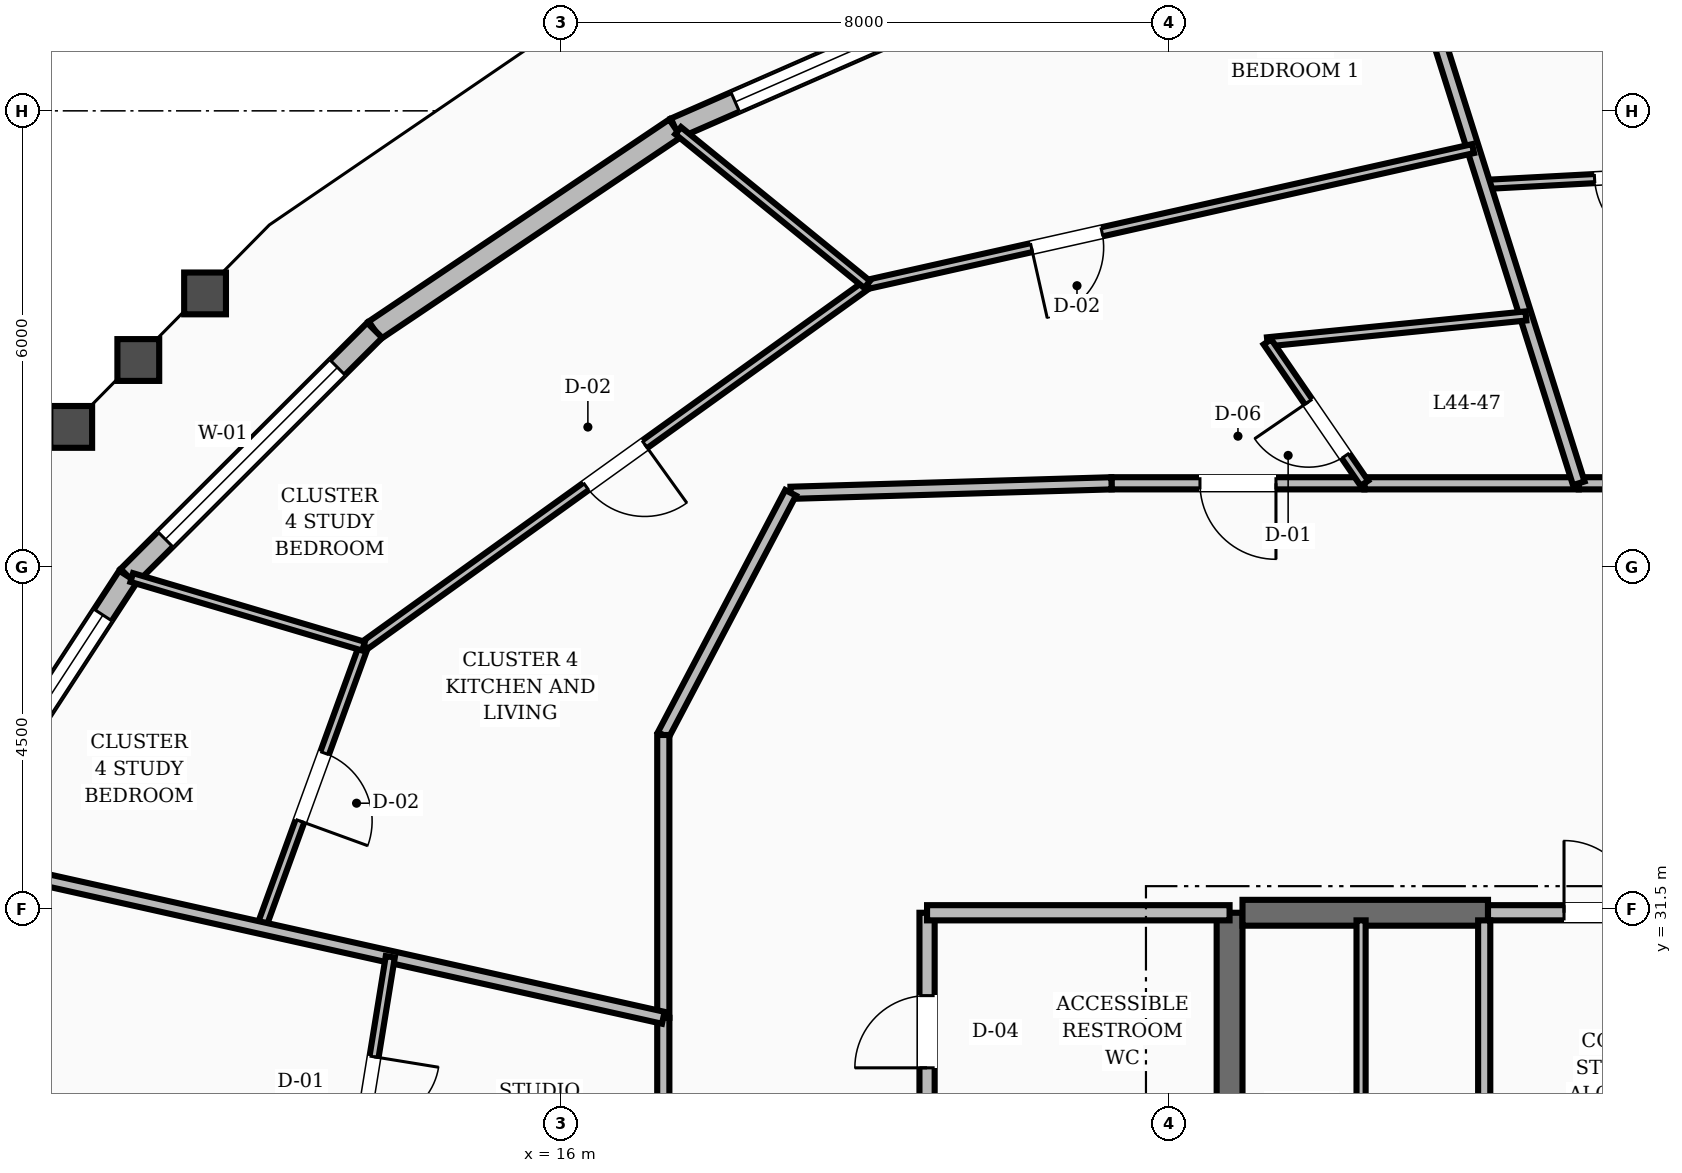
"""IFC4 building model, lengths in metres.
Left out: names, types, materials, properties, quantities, classifications, styles, units other than length and angle.
Written with IfcOpenShell. Run it as: python <this file> out.ifc"""

import sys

from ifc_helpers import new_model, si_unit, direction, frame, frame_2d, origin, place, context, subcontext, project, spatial, rectangle, extrude, element, fill, save


model = new_model("IFC4")
c1 = context("Model", 3, precision=1e-05, world=origin(), true_north=direction((0.0, 1.0)))
c2 = subcontext(c1, "Body", "Model", "MODEL_VIEW")
j1 = project(units=[si_unit("LENGTHUNIT", "METRE"), si_unit("PLANEANGLEUNIT", "RADIAN")], contexts=[c1])
p1 = place(None, origin())
s1 = spatial("IfcSite", under=j1, at=p1, CompositionType="ELEMENT")
p2 = place(p1, origin())
s2 = spatial("IfcBuilding", under=s1, at=p2, CompositionType="ELEMENT")
p3 = place(p2, frame((0.0, 0.0, 171.2)))
s3 = spatial("IfcBuildingStorey", under=s2, at=p3, CompositionType="ELEMENT", Elevation=171.2)
p4 = place(p3, frame((24.8, 25.15, 0.0), z_axis=(0.0, 0.0, 1.0), x_axis=(0.0, 1.0, 0.0)))
e1 = element("IfcWall", 1, at=p4, inside=s3, PredefinedType="SHEAR", context=c2, shape_type="SweptSolid", body=[
    extrude(rectangle(XDim=6.3, YDim=0.34, at=frame_2d((3.15, 0.0))), origin(), (0.0, 0.0, 1.0), 3.6),
])
p5 = place(p3, frame((24.97, 31.45, 0.0), z_axis=(0.0, 0.0, 1.0), x_axis=(1.0, 0.0, 0.0)))
e2 = element("IfcWall", 2, at=p5, inside=s3, PredefinedType="SHEAR", context=c2, shape_type="SweptSolid", body=[
    extrude(rectangle(XDim=3.23, YDim=0.34, at=frame_2d((1.615, 0.0))), origin(), (0.0, 0.0, 1.0), 3.6),
])
p6 = place(p3, frame((22.017, 43.747, 0.0), z_axis=(0.0, 0.0, 1.0), x_axis=(-0.916018444192, -0.401136148832, 0.0)))
e3 = element("IfcWall", 3, at=p6, inside=s3, PredefinedType="STANDARD", context=c2, shape_type="SweptSolid", body=[
    extrude(rectangle(XDim=4.924, YDim=0.28, at=frame_2d((2.462, 0.0))), origin(), (0.0, 0.0, 1.0), 2.82),
])
p7 = place(p6, frame((0.862, 0.0, 0.8)))
e4 = element("IfcOpeningElement", 4, at=p7, cuts=e3, PredefinedType="OPENING", context=c2, shape_type="SweptSolid", body=[
    extrude(rectangle(XDim=3.2, YDim=1.65, at=frame_2d((1.6, 0.825))), frame((0.0, 0.15, 0.0), z_axis=(0.0, -1.0, 0.0), x_axis=(1.0, 0.0, 0.0)), (0.0, 0.0, 1.0), 0.3),
])
p8 = place(p3, frame((17.506, 41.771, 0.0), z_axis=(0.0, 0.0, 1.0), x_axis=(-0.82985197946, -0.557983594909, 0.0)))
e5 = element("IfcWall", 5, at=p8, inside=s3, PredefinedType="STANDARD", context=c2, shape_type="SweptSolid", body=[
    extrude(rectangle(XDim=4.764, YDim=0.28, at=frame_2d((2.382, 0.0))), origin(), (0.0, 0.0, 1.0), 2.82),
])
p9 = place(p3, frame((13.553, 39.113, 0.0), z_axis=(0.0, 0.0, 1.0), x_axis=(-0.707692376563, -0.706520700443, 0.0)))
e6 = element("IfcWall", 6, at=p9, inside=s3, PredefinedType="STANDARD", context=c2, shape_type="SweptSolid", body=[
    extrude(rectangle(XDim=4.584, YDim=0.28, at=frame_2d((2.292, 0.0))), origin(), (0.0, 0.0, 1.0), 2.82),
])
p10 = place(p9, frame((0.692, 0.0, 0.8)))
e7 = element("IfcOpeningElement", 7, at=p10, cuts=e6, PredefinedType="OPENING", context=c2, shape_type="SweptSolid", body=[
    extrude(rectangle(XDim=3.2, YDim=1.65, at=frame_2d((1.6, 0.825))), frame((0.0, 0.15, 0.0), z_axis=(0.0, -1.0, 0.0), x_axis=(1.0, 0.0, 0.0)), (0.0, 0.0, 1.0), 0.3),
])
p11 = place(p3, frame((10.309, 35.875, 0.0), z_axis=(0.0, 0.0, 1.0), x_axis=(-0.546411241489, -0.837517017841, 0.0)))
e8 = element("IfcWall", 8, at=p11, inside=s3, PredefinedType="STANDARD", context=c2, shape_type="SweptSolid", body=[
    extrude(rectangle(XDim=4.412, YDim=0.28, at=frame_2d((2.206, 0.0))), origin(), (0.0, 0.0, 1.0), 2.82),
])
p12 = place(p11, frame((0.606, 0.0, 0.8)))
e9 = element("IfcOpeningElement", 9, at=p12, cuts=e8, PredefinedType="OPENING", context=c2, shape_type="SweptSolid", body=[
    extrude(rectangle(XDim=3.2, YDim=1.65, at=frame_2d((1.6, 0.825))), frame((0.0, 0.15, 0.0), z_axis=(0.0, -1.0, 0.0), x_axis=(1.0, 0.0, 0.0)), (0.0, 0.0, 1.0), 0.3),
])
p13 = place(p3, frame((20.82, 28.32, 0.0), z_axis=(0.0, 0.0, 1.0), x_axis=(0.0, 1.0, 0.0)))
e10 = element("IfcWall", 10, at=p13, inside=s3, PredefinedType="SOLIDWALL", context=c2, shape_type="SweptSolid", body=[
    extrude(rectangle(XDim=3.13, YDim=0.2, at=frame_2d((1.565, 0.0))), origin(), (0.0, 0.0, 1.0), 2.8),
])
p14 = place(p13, frame((1.09, 0.0, 0.0)))
e11 = element("IfcOpeningElement", 11, at=p14, cuts=e10, PredefinedType="OPENING", context=c2, shape_type="SweptSolid", body=[
    extrude(rectangle(XDim=0.95, YDim=2.1, at=frame_2d((0.475, 1.05))), frame((0.0, 0.11, 0.0), z_axis=(0.0, -1.0, 0.0), x_axis=(1.0, 0.0, 0.0)), (0.0, 0.0, 1.0), 0.22),
])
p15 = place(p3, frame((20.82, 31.45, 0.0), z_axis=(0.0, 0.0, 1.0), x_axis=(1.0, 0.0, 0.0)))
e12 = element("IfcWall", 12, at=p15, inside=s3, PredefinedType="SOLIDWALL", context=c2, shape_type="SweptSolid", body=[
    extrude(rectangle(XDim=3.98, YDim=0.2, at=frame_2d((1.99, 0.0))), origin(), (0.0, 0.0, 1.0), 2.8),
])
p16 = place(p3, frame((28.2, 31.45, 0.0), z_axis=(0.0, 0.0, 1.0), x_axis=(1.0, 0.0, 0.0)))
e13 = element("IfcWall", 13, at=p16, inside=s3, PredefinedType="SOLIDWALL", context=c2, shape_type="SweptSolid", body=[
    extrude(rectangle(XDim=7.6, YDim=0.2, at=frame_2d((3.8, 0.0))), origin(), (0.0, 0.0, 1.0), 2.8),
])
p17 = place(p16, frame((1.0, 0.0, 0.0)))
e14 = element("IfcOpeningElement", 14, at=p17, cuts=e13, PredefinedType="OPENING", context=c2, shape_type="SweptSolid", body=[
    extrude(rectangle(XDim=0.95, YDim=2.1, at=frame_2d((0.475, 1.05))), frame((0.0, 0.11, 0.0), z_axis=(0.0, -1.0, 0.0), x_axis=(1.0, 0.0, 0.0)), (0.0, 0.0, 1.0), 0.22),
])
p18 = place(p3, frame((28.15, 25.25, 0.0), z_axis=(0.0, 0.0, 1.0), x_axis=(0.0, 1.0, 0.0)))
e15 = element("IfcWall", 15, at=p18, inside=s3, PredefinedType="SOLIDWALL", context=c2, shape_type="SweptSolid", body=[
    extrude(rectangle(XDim=6.1, YDim=0.16, at=frame_2d((3.05, 0.0))), origin(), (0.0, 0.0, 1.0), 2.8),
])
p19 = place(p3, frame((26.53, 25.25, 0.0), z_axis=(0.0, 0.0, 1.0), x_axis=(0.0, 1.0, 0.0)))
e16 = element("IfcWall", 16, at=p19, inside=s3, PredefinedType="PARTITIONING", context=c2, shape_type="SweptSolid", body=[
    extrude(rectangle(XDim=6.1, YDim=0.12, at=frame_2d((3.05, 0.0))), origin(), (0.0, 0.0, 1.0), 2.8),
])
p20 = place(p3, frame((32.0, 37.1, 0.0), z_axis=(0.0, 0.0, 1.0), x_axis=(-1.0, 0.0, 0.0)))
e17 = element("IfcWall", 17, at=p20, inside=s3, PredefinedType="SOLIDWALL", context=c2, shape_type="SweptSolid", body=[
    extrude(rectangle(XDim=2.606, YDim=0.16, at=frame_2d((1.303, 0.0))), origin(), (0.0, 0.0, 1.0), 2.8),
])
p21 = place(p3, frame((29.394, 37.1, 0.0), z_axis=(0.0, 0.0, 1.0), x_axis=(-1.0, 0.0, 0.0)))
e18 = element("IfcWall", 18, at=p21, inside=s3, PredefinedType="SOLIDWALL", context=c2, shape_type="SweptSolid", body=[
    extrude(rectangle(XDim=2.821, YDim=0.16, at=frame_2d((1.41, 0.0))), origin(), (0.0, 0.0, 1.0), 2.8),
])
p22 = place(p3, frame((26.574, 37.1, 0.0), z_axis=(0.0, 0.0, 1.0), x_axis=(-1.0, 0.0, 0.0)))
e19 = element("IfcWall", 19, at=p22, inside=s3, PredefinedType="SOLIDWALL", context=c2, shape_type="SweptSolid", body=[
    extrude(rectangle(XDim=3.327, YDim=0.16, at=frame_2d((1.664, 0.0))), origin(), (0.0, 0.0, 1.0), 2.8),
])
p23 = place(p22, frame((1.164, 0.0, 0.0)))
e20 = element("IfcOpeningElement", 20, at=p23, cuts=e19, PredefinedType="OPENING", context=c2, shape_type="SweptSolid", body=[
    extrude(rectangle(XDim=1.0, YDim=2.1, at=frame_2d((0.5, 1.05))), frame((0.0, 0.09, 0.0), z_axis=(0.0, -1.0, 0.0), x_axis=(1.0, 0.0, 0.0)), (0.0, 0.0, 1.0), 0.18),
])
p24 = place(p3, frame((23.247, 37.1, 0.0), z_axis=(0.0, 0.0, 1.0), x_axis=(-0.999561990195, -0.029594387265, 0.0)))
e21 = element("IfcWall", 21, at=p24, inside=s3, PredefinedType="SOLIDWALL", context=c2, shape_type="SweptSolid", body=[
    extrude(rectangle(XDim=4.224, YDim=0.16, at=frame_2d((2.112, 0.0))), origin(), (0.0, 0.0, 1.0), 2.8),
])
p25 = place(p3, frame((19.025, 36.975, 0.0), z_axis=(0.0, 0.0, 1.0), x_axis=(-0.46527115782, -0.885168204185, 0.0)))
e22 = element("IfcWall", 22, at=p25, inside=s3, PredefinedType="SOLIDWALL", context=c2, shape_type="SweptSolid", body=[
    extrude(rectangle(XDim=3.6, YDim=0.16, at=frame_2d((1.8, 0.0))), origin(), (0.0, 0.0, 1.0), 2.8),
])
p26 = place(p3, frame((17.35, 33.789, 0.0), z_axis=(0.0, 0.0, 1.0), x_axis=(0.0, -1.0, 0.0)))
e23 = element("IfcWall", 23, at=p26, inside=s3, PredefinedType="SOLIDWALL", context=c2, shape_type="SweptSolid", body=[
    extrude(rectangle(XDim=3.721, YDim=0.16, at=frame_2d((1.86, 0.0))), origin(), (0.0, 0.0, 1.0), 2.8),
])
p27 = place(p3, frame((17.35, 30.068, 0.0), z_axis=(0.0, 0.0, 1.0), x_axis=(0.0, -1.0, 0.0)))
e24 = element("IfcWall", 24, at=p27, inside=s3, PredefinedType="SOLIDWALL", context=c2, shape_type="SweptSolid", body=[
    extrude(rectangle(XDim=3.154, YDim=0.16, at=frame_2d((1.577, 0.0))), origin(), (0.0, 0.0, 1.0), 2.8),
])
p28 = place(p3, frame((32.0, 41.237, 0.0), z_axis=(0.0, 0.0, 1.0), x_axis=(-0.998579231715, -0.053287127784, 0.0)))
e25 = element("IfcWall", 25, at=p28, inside=s3, PredefinedType="PARTITIONING", context=c2, shape_type="SweptSolid", body=[
    extrude(rectangle(XDim=3.853, YDim=0.12, at=frame_2d((1.927, 0.0))), origin(), (0.0, 0.0, 1.0), 2.8),
])
p29 = place(p28, frame((1.452, 0.0, 0.0)))
e26 = element("IfcOpeningElement", 26, at=p29, cuts=e25, PredefinedType="OPENING", context=c2, shape_type="SweptSolid", body=[
    extrude(rectangle(XDim=0.95, YDim=2.1, at=frame_2d((0.475, 1.05))), frame((0.0, 0.07, 0.0), z_axis=(0.0, -1.0, 0.0), x_axis=(1.0, 0.0, 0.0)), (0.0, 0.0, 1.0), 0.14),
])
p30 = place(p3, frame((29.394, 37.1, 0.0), z_axis=(0.0, 0.0, 1.0), x_axis=(-0.301228312568, 0.953552045621, 0.0)))
e27 = element("IfcWall", 27, at=p30, inside=s3, PredefinedType="SOLIDWALL", context=c2, shape_type="SweptSolid", body=[
    extrude(rectangle(XDim=8.196, YDim=0.16, at=frame_2d((4.098, 0.0))), origin(), (0.0, 0.0, 1.0), 2.8),
])
p31 = place(p3, frame((28.699, 39.302, 0.0), z_axis=(0.0, 0.0, 1.0), x_axis=(-0.995023035558, -0.099645164006, 0.0)))
e28 = element("IfcWall", 28, at=p31, inside=s3, PredefinedType="PARTITIONING", context=c2, shape_type="SweptSolid", body=[
    extrude(rectangle(XDim=3.418, YDim=0.12, at=frame_2d((1.709, 0.0))), origin(), (0.0, 0.0, 1.0), 2.8),
])
p32 = place(p3, frame((26.574, 37.1, 0.0), z_axis=(0.0, 0.0, 1.0), x_axis=(-0.565490503486, 0.824754806271, 0.0)))
e29 = element("IfcWall", 29, at=p32, inside=s3, PredefinedType="PARTITIONING", context=c2, shape_type="SweptSolid", body=[
    extrude(rectangle(XDim=2.256, YDim=0.12, at=frame_2d((1.128, 0.0))), origin(), (0.0, 0.0, 1.0), 2.8),
])
p33 = place(p32, frame((0.44, 0.0, 0.0)))
e30 = element("IfcOpeningElement", 30, at=p33, cuts=e29, PredefinedType="OPENING", context=c2, shape_type="SweptSolid", body=[
    extrude(rectangle(XDim=0.86, YDim=2.1, at=frame_2d((0.43, 1.05))), frame((0.0, 0.07, 0.0), z_axis=(0.0, -1.0, 0.0), x_axis=(1.0, 0.0, 0.0)), (0.0, 0.0, 1.0), 0.14),
])
p34 = place(p3, frame((28.003, 41.503, 0.0), z_axis=(0.0, 0.0, 1.0), x_axis=(-0.975777479016, -0.218765425617, 0.0)))
e31 = element("IfcWall", 31, at=p34, inside=s3, PredefinedType="PARTITIONING", context=c2, shape_type="SweptSolid", body=[
    extrude(rectangle(XDim=8.169, YDim=0.12, at=frame_2d((4.084, 0.0))), origin(), (0.0, 0.0, 1.0), 2.8),
])
p35 = place(p34, frame((5.004, 0.0, 0.0)))
e32 = element("IfcOpeningElement", 32, at=p35, cuts=e31, PredefinedType="OPENING", context=c2, shape_type="SweptSolid", body=[
    extrude(rectangle(XDim=0.95, YDim=2.1, at=frame_2d((0.475, 1.05))), frame((0.0, 0.07, 0.0), z_axis=(0.0, -1.0, 0.0), x_axis=(1.0, 0.0, 0.0)), (0.0, 0.0, 1.0), 0.14),
])
p36 = place(p3, frame((20.032, 39.716, 0.0), z_axis=(0.0, 0.0, 1.0), x_axis=(-0.812167375512, -0.58342450596, 0.0)))
e33 = element("IfcWall", 33, at=p36, inside=s3, PredefinedType="PARTITIONING", context=c2, shape_type="SweptSolid", body=[
    extrude(rectangle(XDim=8.157, YDim=0.12, at=frame_2d((4.079, 0.0))), origin(), (0.0, 0.0, 1.0), 2.8),
])
p37 = place(p36, frame((3.604, 0.0, 0.0)))
e34 = element("IfcOpeningElement", 34, at=p37, cuts=e33, PredefinedType="OPENING", context=c2, shape_type="SweptSolid", body=[
    extrude(rectangle(XDim=0.95, YDim=2.1, at=frame_2d((0.475, 1.05))), frame((0.0, 0.07, 0.0), z_axis=(0.0, -1.0, 0.0), x_axis=(1.0, 0.0, 0.0)), (0.0, 0.0, 1.0), 0.14),
])
p38 = place(p3, frame((20.032, 39.716, 0.0), z_axis=(0.0, 0.0, 1.0), x_axis=(-0.775664293068, 0.631145707788, 0.0)))
e35 = element("IfcWall", 35, at=p38, inside=s3, PredefinedType="PARTITIONING", context=c2, shape_type="SweptSolid", body=[
    extrude(rectangle(XDim=3.206, YDim=0.12, at=frame_2d((1.603, 0.0))), origin(), (0.0, 0.0, 1.0), 2.8),
])
p39 = place(p3, frame((13.407, 34.957, 0.0), z_axis=(0.0, 0.0, 1.0), x_axis=(-0.342269779856, -0.939601722964, 0.0)))
e36 = element("IfcWall", 36, at=p39, inside=s3, PredefinedType="PARTITIONING", context=c2, shape_type="SweptSolid", body=[
    extrude(rectangle(XDim=3.945, YDim=0.12, at=frame_2d((1.972, 0.0))), origin(), (0.0, 0.0, 1.0), 2.8),
])
p40 = place(p39, frame((1.497, 0.0, 0.0)))
e37 = element("IfcOpeningElement", 37, at=p40, cuts=e36, PredefinedType="OPENING", context=c2, shape_type="SweptSolid", body=[
    extrude(rectangle(XDim=0.95, YDim=2.1, at=frame_2d((0.475, 1.05))), frame((0.0, 0.07, 0.0), z_axis=(0.0, -1.0, 0.0), x_axis=(1.0, 0.0, 0.0)), (0.0, 0.0, 1.0), 0.14),
])
p41 = place(p3, frame((13.407, 34.957, 0.0), z_axis=(0.0, 0.0, 1.0), x_axis=(-0.958817465397, 0.284023006198, 0.0)))
e38 = element("IfcWall", 38, at=p41, inside=s3, PredefinedType="PARTITIONING", context=c2, shape_type="SweptSolid", body=[
    extrude(rectangle(XDim=3.181, YDim=0.12, at=frame_2d((1.591, 0.0))), origin(), (0.0, 0.0, 1.0), 2.8),
])
p42 = place(p3, frame((17.35, 30.068, 0.0), z_axis=(0.0, 0.0, 1.0), x_axis=(-0.975950982727, 0.217990089947, 0.0)))
e39 = element("IfcWall", 39, at=p42, inside=s3, PredefinedType="SOLIDWALL", context=c2, shape_type="SweptSolid", body=[
    extrude(rectangle(XDim=9.635, YDim=0.16, at=frame_2d((4.817, 0.0))), origin(), (0.0, 0.0, 1.0), 2.8),
])
p43 = place(p3, frame((13.758, 30.87, 0.0), z_axis=(0.0, 0.0, 1.0), x_axis=(-0.160083927962, -0.987103406948, 0.0)))
e40 = element("IfcWall", 40, at=p43, inside=s3, PredefinedType="PARTITIONING", context=c2, shape_type="SweptSolid", body=[
    extrude(rectangle(XDim=3.524, YDim=0.12, at=frame_2d((1.762, 0.0))), origin(), (0.0, 0.0, 1.0), 2.8),
])
p44 = place(p43, frame((1.332, 0.0, 0.0)))
e41 = element("IfcOpeningElement", 41, at=p44, cuts=e40, PredefinedType="OPENING", context=c2, shape_type="SweptSolid", body=[
    extrude(rectangle(XDim=0.86, YDim=2.1, at=frame_2d((0.43, 1.05))), frame((0.0, 0.07, 0.0), z_axis=(0.0, -1.0, 0.0), x_axis=(1.0, 0.0, 0.0)), (0.0, 0.0, 1.0), 0.14),
])
p45 = place(p7, origin())
e42 = element("IfcWindow", 42, at=p45, inside=s3, PartitioningType="SINGLE_PANEL", PredefinedType="WINDOW", context=c2, shape_type="SweptSolid", body=[
    extrude(rectangle(XDim=3.2, YDim=1.65, at=frame_2d((1.6, 0.825))), frame((0.0, 0.03, 0.0), z_axis=(0.0, -1.0, 0.0), x_axis=(1.0, 0.0, 0.0)), (0.0, 0.0, 1.0), 0.06),
])
fill(e4, e42)
p46 = place(p10, origin())
e43 = element("IfcWindow", 43, at=p46, inside=s3, PartitioningType="SINGLE_PANEL", PredefinedType="WINDOW", context=c2, shape_type="SweptSolid", body=[
    extrude(rectangle(XDim=3.2, YDim=1.65, at=frame_2d((1.6, 0.825))), frame((0.0, 0.03, 0.0), z_axis=(0.0, -1.0, 0.0), x_axis=(1.0, 0.0, 0.0)), (0.0, 0.0, 1.0), 0.06),
])
fill(e7, e43)
p47 = place(p12, origin())
e44 = element("IfcWindow", 44, at=p47, inside=s3, PartitioningType="SINGLE_PANEL", PredefinedType="WINDOW", context=c2, shape_type="SweptSolid", body=[
    extrude(rectangle(XDim=3.2, YDim=1.65, at=frame_2d((1.6, 0.825))), frame((0.0, 0.03, 0.0), z_axis=(0.0, -1.0, 0.0), x_axis=(1.0, 0.0, 0.0)), (0.0, 0.0, 1.0), 0.06),
])
fill(e9, e44)
p48 = place(p14, origin())
e45 = element("IfcDoor", 45, at=p48, inside=s3, OperationType="SINGLE_SWING_LEFT", PredefinedType="DOOR", context=c2, shape_type="SweptSolid", body=[
    extrude(rectangle(XDim=0.95, YDim=2.1, at=frame_2d((0.475, 1.05))), frame((0.0, 0.025, 0.0), z_axis=(0.0, -1.0, 0.0), x_axis=(1.0, 0.0, 0.0)), (0.0, 0.0, 1.0), 0.05),
])
fill(e11, e45)
p49 = place(p17, origin())
e46 = element("IfcDoor", 46, at=p49, inside=s3, OperationType="SINGLE_SWING_LEFT", PredefinedType="DOOR", context=c2, shape_type="SweptSolid", body=[
    extrude(rectangle(XDim=0.95, YDim=2.1, at=frame_2d((0.475, 1.05))), frame((0.0, 0.025, 0.0), z_axis=(0.0, -1.0, 0.0), x_axis=(1.0, 0.0, 0.0)), (0.0, 0.0, 1.0), 0.05),
])
fill(e14, e46)
p50 = place(p29, origin())
e47 = element("IfcDoor", 47, at=p50, inside=s3, OperationType="SINGLE_SWING_LEFT", PredefinedType="DOOR", context=c2, shape_type="SweptSolid", body=[
    extrude(rectangle(XDim=0.95, YDim=2.1, at=frame_2d((0.475, 1.05))), frame((0.0, 0.025, 0.0), z_axis=(0.0, -1.0, 0.0), x_axis=(1.0, 0.0, 0.0)), (0.0, 0.0, 1.0), 0.05),
])
fill(e26, e47)
p51 = place(p33, origin())
e48 = element("IfcDoor", 48, at=p51, inside=s3, OperationType="SINGLE_SWING_RIGHT", PredefinedType="DOOR", context=c2, shape_type="SweptSolid", body=[
    extrude(rectangle(XDim=0.86, YDim=2.1, at=frame_2d((0.43, 1.05))), frame((0.0, 0.025, 0.0), z_axis=(0.0, -1.0, 0.0), x_axis=(1.0, 0.0, 0.0)), (0.0, 0.0, 1.0), 0.05),
])
fill(e30, e48)
p52 = place(p23, origin())
e49 = element("IfcDoor", 49, at=p52, inside=s3, OperationType="SINGLE_SWING_LEFT", PredefinedType="DOOR", context=c2, shape_type="SweptSolid", body=[
    extrude(rectangle(XDim=1.0, YDim=2.1, at=frame_2d((0.5, 1.05))), frame((0.0, 0.025, 0.0), z_axis=(0.0, -1.0, 0.0), x_axis=(1.0, 0.0, 0.0)), (0.0, 0.0, 1.0), 0.05),
])
fill(e20, e49)
p53 = place(p35, origin())
e50 = element("IfcDoor", 50, at=p53, inside=s3, OperationType="SINGLE_SWING_RIGHT", PredefinedType="DOOR", context=c2, shape_type="SweptSolid", body=[
    extrude(rectangle(XDim=0.95, YDim=2.1, at=frame_2d((0.475, 1.05))), frame((0.0, 0.025, 0.0), z_axis=(0.0, -1.0, 0.0), x_axis=(1.0, 0.0, 0.0)), (0.0, 0.0, 1.0), 0.05),
])
fill(e32, e50)
p54 = place(p37, origin())
e51 = element("IfcDoor", 51, at=p54, inside=s3, OperationType="SINGLE_SWING_LEFT", PredefinedType="DOOR", context=c2, shape_type="SweptSolid", body=[
    extrude(rectangle(XDim=0.95, YDim=2.1, at=frame_2d((0.475, 1.05))), frame((0.0, 0.025, 0.0), z_axis=(0.0, -1.0, 0.0), x_axis=(1.0, 0.0, 0.0)), (0.0, 0.0, 1.0), 0.05),
])
fill(e34, e51)
p55 = place(p40, origin())
e52 = element("IfcDoor", 52, at=p55, inside=s3, OperationType="SINGLE_SWING_RIGHT", PredefinedType="DOOR", context=c2, shape_type="SweptSolid", body=[
    extrude(rectangle(XDim=0.95, YDim=2.1, at=frame_2d((0.475, 1.05))), frame((0.0, 0.025, 0.0), z_axis=(0.0, -1.0, 0.0), x_axis=(1.0, 0.0, 0.0)), (0.0, 0.0, 1.0), 0.05),
])
fill(e37, e52)
p56 = place(p44, origin())
e53 = element("IfcDoor", 53, at=p56, inside=s3, OperationType="SINGLE_SWING_LEFT", PredefinedType="DOOR", context=c2, shape_type="SweptSolid", body=[
    extrude(rectangle(XDim=0.86, YDim=2.1, at=frame_2d((0.43, 1.05))), frame((0.0, 0.025, 0.0), z_axis=(0.0, -1.0, 0.0), x_axis=(1.0, 0.0, 0.0)), (0.0, 0.0, 1.0), 0.05),
])
fill(e41, e53)
save(model, sys.argv[1])
